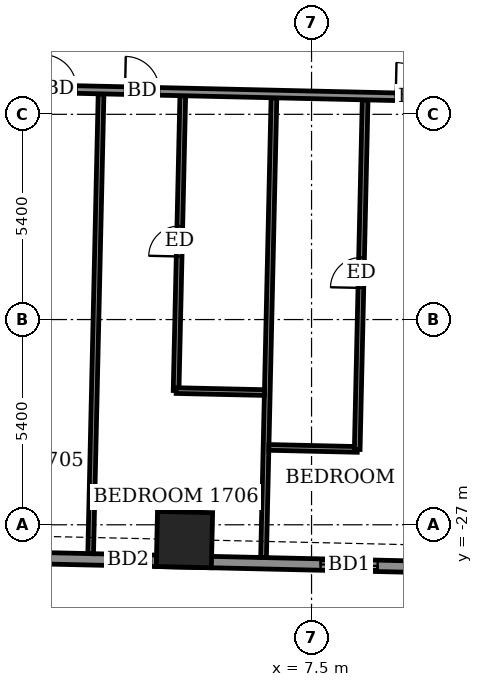
"""IFC4 building model, lengths in metres.
Left out: names, types, materials, properties, quantities, classifications, styles, units other than length and angle.
Written with IfcOpenShell. Run it as: python <this file> out.ifc"""

import sys

from ifc_helpers import new_model, si_unit, direction, frame, frame_2d, origin, origin_2d, place, context, subcontext, project, spatial, rectangle, extrude, element, fill, save


model = new_model("IFC4")
c1 = context("Model", 3, precision=1e-05, world=origin(), true_north=direction((0.0, 1.0)))
c2 = subcontext(c1, "Body", "Model", "MODEL_VIEW")
j1 = project(units=[si_unit("LENGTHUNIT", "METRE"), si_unit("PLANEANGLEUNIT", "RADIAN")], contexts=[c1])
p1 = place(None, origin())
s1 = spatial("IfcSite", under=j1, at=p1, CompositionType="ELEMENT")
p2 = place(p1, origin())
s2 = spatial("IfcBuilding", under=s1, at=p2, CompositionType="ELEMENT")
p3 = place(p2, frame((0.0, 0.0, 71.1)))
s3 = spatial("IfcBuildingStorey", under=s2, at=p3, CompositionType="ELEMENT", Elevation=71.1)
p4 = place(p3, frame((4.156, -27.389, -0.55), z_axis=(0.0, 0.0, 1.0), x_axis=(0.999742746705, -0.022681278839, 0.0)))
e1 = element("IfcColumn", 1, at=p4, inside=s3, PredefinedType="COLUMN", context=c2, shape_type="SweptSolid", body=[
    extrude(rectangle(XDim=1.45, YDim=1.45, at=origin_2d()), origin(), (0.0, 0.0, 1.0), 3.6),
])
p5 = place(p3, frame((-24.007, -27.326, 0.0), z_axis=(0.0, 0.0, 1.0), x_axis=(0.999742536491, -0.022690542744, 0.0)))
e2 = element("IfcWall", 2, at=p5, inside=s3, PredefinedType="SOLIDWALL", context=c2, shape_type="SweptSolid", body=[
    extrude(rectangle(XDim=49.236, YDim=0.3, at=frame_2d((24.618, 0.0))), origin(), (0.0, 0.0, 1.0), 3.05),
])
p6 = place(p5, frame((1.391, 0.0, 0.0)))
e3 = element("IfcOpeningElement", 3, at=p6, cuts=e2, PredefinedType="OPENING", context=c2, shape_type="SweptSolid", body=[
    extrude(rectangle(XDim=1.2, YDim=2.4, at=frame_2d((0.6, 1.2))), frame((0.0, 0.16, 0.0), z_axis=(0.0, -1.0, 0.0), x_axis=(1.0, 0.0, 0.0)), (0.0, 0.0, 1.0), 0.32),
])
p7 = place(p5, frame((3.901, 0.0, 0.0)))
e4 = element("IfcOpeningElement", 4, at=p7, cuts=e2, PredefinedType="OPENING", context=c2, shape_type="SweptSolid", body=[
    extrude(rectangle(XDim=1.5, YDim=2.4, at=frame_2d((0.75, 1.2))), frame((0.0, 0.16, 0.0), z_axis=(0.0, -1.0, 0.0), x_axis=(1.0, 0.0, 0.0)), (0.0, 0.0, 1.0), 0.32),
])
p8 = place(p5, frame((9.1, 0.0, 0.0)))
e5 = element("IfcOpeningElement", 5, at=p8, cuts=e2, PredefinedType="OPENING", context=c2, shape_type="SweptSolid", body=[
    extrude(rectangle(XDim=1.5, YDim=2.4, at=frame_2d((0.75, 1.2))), frame((0.0, 0.16, 0.0), z_axis=(0.0, -1.0, 0.0), x_axis=(1.0, 0.0, 0.0)), (0.0, 0.0, 1.0), 0.32),
])
p9 = place(p5, frame((14.889, 0.0, 0.0)))
e6 = element("IfcOpeningElement", 6, at=p9, cuts=e2, PredefinedType="OPENING", context=c2, shape_type="SweptSolid", body=[
    extrude(rectangle(XDim=1.5, YDim=2.4, at=frame_2d((0.75, 1.2))), frame((0.0, 0.16, 0.0), z_axis=(0.0, -1.0, 0.0), x_axis=(1.0, 0.0, 0.0)), (0.0, 0.0, 1.0), 0.32),
])
p10 = place(p5, frame((17.952, 0.0, 0.0)))
e7 = element("IfcOpeningElement", 7, at=p10, cuts=e2, PredefinedType="OPENING", context=c2, shape_type="SweptSolid", body=[
    extrude(rectangle(XDim=1.5, YDim=2.4, at=frame_2d((0.75, 1.2))), frame((0.0, 0.16, 0.0), z_axis=(0.0, -1.0, 0.0), x_axis=(1.0, 0.0, 0.0)), (0.0, 0.0, 1.0), 0.32),
])
p11 = place(p5, frame((22.878, 0.0, 0.0)))
e8 = element("IfcOpeningElement", 8, at=p11, cuts=e2, PredefinedType="OPENING", context=c2, shape_type="SweptSolid", body=[
    extrude(rectangle(XDim=1.5, YDim=2.4, at=frame_2d((0.75, 1.2))), frame((0.0, 0.16, 0.0), z_axis=(0.0, -1.0, 0.0), x_axis=(1.0, 0.0, 0.0)), (0.0, 0.0, 1.0), 0.32),
])
p12 = place(p5, frame((26.091, 0.0, 0.0)))
e9 = element("IfcOpeningElement", 9, at=p12, cuts=e2, PredefinedType="OPENING", context=c2, shape_type="SweptSolid", body=[
    extrude(rectangle(XDim=1.2, YDim=2.4, at=frame_2d((0.6, 1.2))), frame((0.0, 0.16, 0.0), z_axis=(0.0, -1.0, 0.0), x_axis=(1.0, 0.0, 0.0)), (0.0, 0.0, 1.0), 0.32),
])
p13 = place(p5, frame((31.754, 0.0, 0.0)))
e10 = element("IfcOpeningElement", 10, at=p13, cuts=e2, PredefinedType="OPENING", context=c2, shape_type="SweptSolid", body=[
    extrude(rectangle(XDim=1.5, YDim=2.4, at=frame_2d((0.75, 1.2))), frame((0.0, 0.16, 0.0), z_axis=(0.0, -1.0, 0.0), x_axis=(1.0, 0.0, 0.0)), (0.0, 0.0, 1.0), 0.32),
])
p14 = place(p5, frame((36.854, 0.0, 0.0)))
e11 = element("IfcOpeningElement", 11, at=p14, cuts=e2, PredefinedType="OPENING", context=c2, shape_type="SweptSolid", body=[
    extrude(rectangle(XDim=1.5, YDim=2.4, at=frame_2d((0.75, 1.2))), frame((0.0, 0.16, 0.0), z_axis=(0.0, -1.0, 0.0), x_axis=(1.0, 0.0, 0.0)), (0.0, 0.0, 1.0), 0.32),
])
p15 = place(p5, frame((39.917, 0.0, 0.0)))
e12 = element("IfcOpeningElement", 12, at=p15, cuts=e2, PredefinedType="OPENING", context=c2, shape_type="SweptSolid", body=[
    extrude(rectangle(XDim=1.5, YDim=2.4, at=frame_2d((0.75, 1.2))), frame((0.0, 0.16, 0.0), z_axis=(0.0, -1.0, 0.0), x_axis=(1.0, 0.0, 0.0)), (0.0, 0.0, 1.0), 0.32),
])
p16 = place(p5, frame((45.072, 0.0, 0.9)))
e13 = element("IfcOpeningElement", 13, at=p16, cuts=e2, PredefinedType="OPENING", context=c2, shape_type="SweptSolid", body=[
    extrude(rectangle(XDim=2.4, YDim=1.5, at=frame_2d((1.2, 0.75))), frame((0.0, 0.16, 0.0), z_axis=(0.0, -1.0, 0.0), x_axis=(1.0, 0.0, 0.0)), (0.0, 0.0, 1.0), 0.32),
])
p17 = place(p3, frame((1.688, -27.759, 0.0), z_axis=(0.0, 0.0, 1.0), x_axis=(0.02263844782, 0.9997437175, 0.0)))
e14 = element("IfcWall", 14, at=p17, inside=s3, PredefinedType="PARTITIONING", context=c2, shape_type="SweptSolid", body=[
    extrude(rectangle(XDim=12.1, YDim=0.15, at=frame_2d((6.05, 0.0))), origin(), (0.0, 0.0, 1.0), 2.55),
])
p18 = place(p3, frame((6.237, -27.862, 0.0), z_axis=(0.0, 0.0, 1.0), x_axis=(0.022637991173, 0.99974372784, 0.0)))
e15 = element("IfcWall", 15, at=p18, inside=s3, PredefinedType="PARTITIONING", context=c2, shape_type="SweptSolid", body=[
    extrude(rectangle(XDim=12.1, YDim=0.15, at=frame_2d((6.05, 0.0))), origin(), (0.0, 0.0, 1.0), 2.55),
])
p19 = place(p3, frame((6.379, -24.964, 0.0), z_axis=(0.0, 0.0, 1.0), x_axis=(0.99974053329, -0.022778632478, 0.0)))
e16 = element("IfcWall", 16, at=p19, inside=s3, PredefinedType="PARTITIONING", context=c2, shape_type="SweptSolid", body=[
    extrude(rectangle(XDim=2.326, YDim=0.15, at=frame_2d((1.163, 0.0))), origin(), (0.0, 0.0, 1.0), 3.05),
])
p20 = place(p3, frame((8.702, -25.017, 0.0), z_axis=(0.0, 0.0, 1.0), x_axis=(0.022611084784, 0.999744336741, 0.0)))
e17 = element("IfcWall", 17, at=p20, inside=s3, PredefinedType="PARTITIONING", context=c2, shape_type="SweptSolid", body=[
    extrude(rectangle(XDim=9.199, YDim=0.15, at=frame_2d((4.6, 0.0))), origin(), (0.0, 0.0, 1.0), 3.05),
])
p21 = place(p20, frame((4.25, 0.0, 0.0)))
e18 = element("IfcOpeningElement", 18, at=p21, cuts=e17, PredefinedType="OPENING", context=c2, shape_type="SweptSolid", body=[
    extrude(rectangle(XDim=0.8, YDim=2.1, at=frame_2d((0.4, 1.05))), frame((0.0, 0.085, 0.0), z_axis=(0.0, -1.0, 0.0), x_axis=(1.0, 0.0, 0.0)), (0.0, 0.0, 1.0), 0.17),
])
p22 = place(p3, frame((3.936, -23.469, 0.0), z_axis=(0.0, 0.0, 1.0), x_axis=(0.022683528451, 0.999742695666, 0.0)))
e19 = element("IfcWall", 19, at=p22, inside=s3, PredefinedType="PARTITIONING", context=c2, shape_type="SweptSolid", body=[
    extrude(rectangle(XDim=7.76, YDim=0.15, at=frame_2d((3.88, 0.0))), origin(), (0.0, 0.0, 1.0), 3.05),
])
p23 = place(p22, frame((3.53, 0.0, 0.0)))
e20 = element("IfcOpeningElement", 20, at=p23, cuts=e19, PredefinedType="OPENING", context=c2, shape_type="SweptSolid", body=[
    extrude(rectangle(XDim=0.8, YDim=2.1, at=frame_2d((0.4, 1.05))), frame((0.0, 0.085, 0.0), z_axis=(0.0, -1.0, 0.0), x_axis=(1.0, 0.0, 0.0)), (0.0, 0.0, 1.0), 0.17),
])
p24 = place(p3, frame((3.938, -23.469, 0.0), z_axis=(0.0, 0.0, 1.0), x_axis=(0.999749744571, -0.022370700241, 0.0)))
e21 = element("IfcWall", 21, at=p24, inside=s3, PredefinedType="PARTITIONING", context=c2, shape_type="SweptSolid", body=[
    extrude(rectangle(XDim=2.324, YDim=0.15, at=frame_2d((1.162, 0.0))), origin(), (0.0, 0.0, 1.0), 3.05),
])
p25 = place(p3, frame((-26.151, -14.924, 0.0), z_axis=(0.0, 0.0, 1.0), x_axis=(0.999742750999, -0.022681089575, 0.0)))
e22 = element("IfcWall", 22, at=p25, inside=s3, PredefinedType="PARTITIONING", context=c2, shape_type="SweptSolid", body=[
    extrude(rectangle(XDim=54.886, YDim=0.2, at=frame_2d((27.443, 0.0))), origin(), (0.0, 0.0, 1.0), 3.05),
])
p26 = place(p25, frame((1.345, 0.0, 0.0)))
e23 = element("IfcOpeningElement", 23, at=p26, cuts=e22, PredefinedType="OPENING", context=c2, shape_type="SweptSolid", body=[
    extrude(rectangle(XDim=1.0, YDim=2.1, at=frame_2d((0.5, 1.05))), frame((0.0, 0.11, 0.0), z_axis=(0.0, -1.0, 0.0), x_axis=(1.0, 0.0, 0.0)), (0.0, 0.0, 1.0), 0.22),
])
p27 = place(p25, frame((8.35, 0.0, 0.0)))
e24 = element("IfcOpeningElement", 24, at=p27, cuts=e22, PredefinedType="OPENING", context=c2, shape_type="SweptSolid", body=[
    extrude(rectangle(XDim=0.9, YDim=2.1, at=frame_2d((0.45, 1.05))), frame((0.0, 0.11, 0.0), z_axis=(0.0, -1.0, 0.0), x_axis=(1.0, 0.0, 0.0)), (0.0, 0.0, 1.0), 0.22),
])
p28 = place(p25, frame((10.625, 0.0, 0.0)))
e25 = element("IfcOpeningElement", 25, at=p28, cuts=e22, PredefinedType="OPENING", context=c2, shape_type="SweptSolid", body=[
    extrude(rectangle(XDim=0.9, YDim=2.1, at=frame_2d((0.45, 1.05))), frame((0.0, 0.11, 0.0), z_axis=(0.0, -1.0, 0.0), x_axis=(1.0, 0.0, 0.0)), (0.0, 0.0, 1.0), 0.22),
])
p29 = place(p25, frame((17.675, 0.0, 0.0)))
e26 = element("IfcOpeningElement", 26, at=p29, cuts=e22, PredefinedType="OPENING", context=c2, shape_type="SweptSolid", body=[
    extrude(rectangle(XDim=0.9, YDim=2.1, at=frame_2d((0.45, 1.05))), frame((0.0, 0.11, 0.0), z_axis=(0.0, -1.0, 0.0), x_axis=(1.0, 0.0, 0.0)), (0.0, 0.0, 1.0), 0.22),
])
p30 = place(p25, frame((19.725, 0.0, 0.0)))
e27 = element("IfcOpeningElement", 27, at=p30, cuts=e22, PredefinedType="OPENING", context=c2, shape_type="SweptSolid", body=[
    extrude(rectangle(XDim=0.9, YDim=2.1, at=frame_2d((0.45, 1.05))), frame((0.0, 0.11, 0.0), z_axis=(0.0, -1.0, 0.0), x_axis=(1.0, 0.0, 0.0)), (0.0, 0.0, 1.0), 0.22),
])
p31 = place(p25, frame((26.575, 0.0, 0.0)))
e28 = element("IfcOpeningElement", 28, at=p31, cuts=e22, PredefinedType="OPENING", context=c2, shape_type="SweptSolid", body=[
    extrude(rectangle(XDim=0.9, YDim=2.1, at=frame_2d((0.45, 1.05))), frame((0.0, 0.11, 0.0), z_axis=(0.0, -1.0, 0.0), x_axis=(1.0, 0.0, 0.0)), (0.0, 0.0, 1.0), 0.22),
])
p32 = place(p25, frame((28.75, 0.0, 0.0)))
e29 = element("IfcOpeningElement", 29, at=p32, cuts=e22, PredefinedType="OPENING", context=c2, shape_type="SweptSolid", body=[
    extrude(rectangle(XDim=0.9, YDim=2.1, at=frame_2d((0.45, 1.05))), frame((0.0, 0.11, 0.0), z_axis=(0.0, -1.0, 0.0), x_axis=(1.0, 0.0, 0.0)), (0.0, 0.0, 1.0), 0.22),
])
p33 = place(p25, frame((35.875, 0.0, 0.0)))
e30 = element("IfcOpeningElement", 30, at=p33, cuts=e22, PredefinedType="OPENING", context=c2, shape_type="SweptSolid", body=[
    extrude(rectangle(XDim=0.9, YDim=2.1, at=frame_2d((0.45, 1.05))), frame((0.0, 0.11, 0.0), z_axis=(0.0, -1.0, 0.0), x_axis=(1.0, 0.0, 0.0)), (0.0, 0.0, 1.0), 0.22),
])
p34 = place(p25, frame((38.1, 0.0, 0.0)))
e31 = element("IfcOpeningElement", 31, at=p34, cuts=e22, PredefinedType="OPENING", context=c2, shape_type="SweptSolid", body=[
    extrude(rectangle(XDim=0.9, YDim=2.1, at=frame_2d((0.45, 1.05))), frame((0.0, 0.11, 0.0), z_axis=(0.0, -1.0, 0.0), x_axis=(1.0, 0.0, 0.0)), (0.0, 0.0, 1.0), 0.22),
])
p35 = place(p25, frame((45.125, 0.0, 0.0)))
e32 = element("IfcOpeningElement", 32, at=p35, cuts=e22, PredefinedType="OPENING", context=c2, shape_type="SweptSolid", body=[
    extrude(rectangle(XDim=0.9, YDim=2.1, at=frame_2d((0.45, 1.05))), frame((0.0, 0.11, 0.0), z_axis=(0.0, -1.0, 0.0), x_axis=(1.0, 0.0, 0.0)), (0.0, 0.0, 1.0), 0.22),
])
p36 = place(p25, frame((52.618, 0.0, 0.0)))
e33 = element("IfcOpeningElement", 33, at=p36, cuts=e22, PredefinedType="OPENING", context=c2, shape_type="SweptSolid", body=[
    extrude(rectangle(XDim=1.0, YDim=2.1, at=frame_2d((0.5, 1.05))), frame((0.0, 0.11, 0.0), z_axis=(0.0, -1.0, 0.0), x_axis=(1.0, 0.0, 0.0)), (0.0, 0.0, 1.0), 0.22),
])
p37 = place(p25, frame((47.575, 0.0, 0.0)))
e34 = element("IfcOpeningElement", 34, at=p37, cuts=e22, PredefinedType="OPENING", context=c2, shape_type="SweptSolid", body=[
    extrude(rectangle(XDim=0.9, YDim=2.1, at=frame_2d((0.45, 1.05))), frame((0.0, 0.11, 0.0), z_axis=(0.0, -1.0, 0.0), x_axis=(1.0, 0.0, 0.0)), (0.0, 0.0, 1.0), 0.22),
])
p38 = place(p12, origin())
e35 = element("IfcDoor", 35, at=p38, inside=s3, OperationType="SLIDING_TO_LEFT", PredefinedType="DOOR", context=c2, shape_type="SweptSolid", body=[
    extrude(rectangle(XDim=1.2, YDim=2.4, at=frame_2d((0.6, 1.2))), frame((0.0, 0.025, 0.0), z_axis=(0.0, -1.0, 0.0), x_axis=(1.0, 0.0, 0.0)), (0.0, 0.0, 1.0), 0.05),
])
fill(e9, e35)
p39 = place(p13, origin())
e36 = element("IfcDoor", 36, at=p39, inside=s3, OperationType="SLIDING_TO_LEFT", PredefinedType="DOOR", context=c2, shape_type="SweptSolid", body=[
    extrude(rectangle(XDim=1.5, YDim=2.4, at=frame_2d((0.75, 1.2))), frame((0.0, 0.025, 0.0), z_axis=(0.0, -1.0, 0.0), x_axis=(1.0, 0.0, 0.0)), (0.0, 0.0, 1.0), 0.05),
])
fill(e10, e36)
p40 = place(p31, origin())
e37 = element("IfcDoor", 37, at=p40, inside=s3, OperationType="SINGLE_SWING_LEFT", PredefinedType="DOOR", context=c2, shape_type="SweptSolid", body=[
    extrude(rectangle(XDim=0.9, YDim=2.1, at=frame_2d((0.45, 1.05))), frame((0.0, 0.025, 0.0), z_axis=(0.0, -1.0, 0.0), x_axis=(1.0, 0.0, 0.0)), (0.0, 0.0, 1.0), 0.05),
])
fill(e28, e37)
p41 = place(p32, origin())
e38 = element("IfcDoor", 38, at=p41, inside=s3, OperationType="SINGLE_SWING_RIGHT", PredefinedType="DOOR", context=c2, shape_type="SweptSolid", body=[
    extrude(rectangle(XDim=0.9, YDim=2.1, at=frame_2d((0.45, 1.05))), frame((0.0, 0.025, 0.0), z_axis=(0.0, -1.0, 0.0), x_axis=(1.0, 0.0, 0.0)), (0.0, 0.0, 1.0), 0.05),
])
fill(e29, e38)
p42 = place(p23, origin())
e39 = element("IfcDoor", 39, at=p42, inside=s3, OperationType="SINGLE_SWING_RIGHT", PredefinedType="DOOR", context=c2, shape_type="SweptSolid", body=[
    extrude(rectangle(XDim=0.8, YDim=2.1, at=frame_2d((0.4, 1.05))), frame((0.0, 0.025, 0.0), z_axis=(0.0, -1.0, 0.0), x_axis=(1.0, 0.0, 0.0)), (0.0, 0.0, 1.0), 0.05),
])
fill(e20, e39)
p43 = place(p33, origin())
e40 = element("IfcDoor", 40, at=p43, inside=s3, OperationType="SINGLE_SWING_LEFT", PredefinedType="DOOR", context=c2, shape_type="SweptSolid", body=[
    extrude(rectangle(XDim=0.9, YDim=2.1, at=frame_2d((0.45, 1.05))), frame((0.0, 0.025, 0.0), z_axis=(0.0, -1.0, 0.0), x_axis=(1.0, 0.0, 0.0)), (0.0, 0.0, 1.0), 0.05),
])
fill(e30, e40)
p44 = place(p21, origin())
e41 = element("IfcDoor", 41, at=p44, inside=s3, OperationType="SINGLE_SWING_LEFT", PredefinedType="DOOR", context=c2, shape_type="SweptSolid", body=[
    extrude(rectangle(XDim=0.8, YDim=2.1, at=frame_2d((0.4, 1.05))), frame((0.0, 0.025, 0.0), z_axis=(0.0, -1.0, 0.0), x_axis=(1.0, 0.0, 0.0)), (0.0, 0.0, 1.0), 0.05),
])
fill(e18, e41)
save(model, sys.argv[1])
